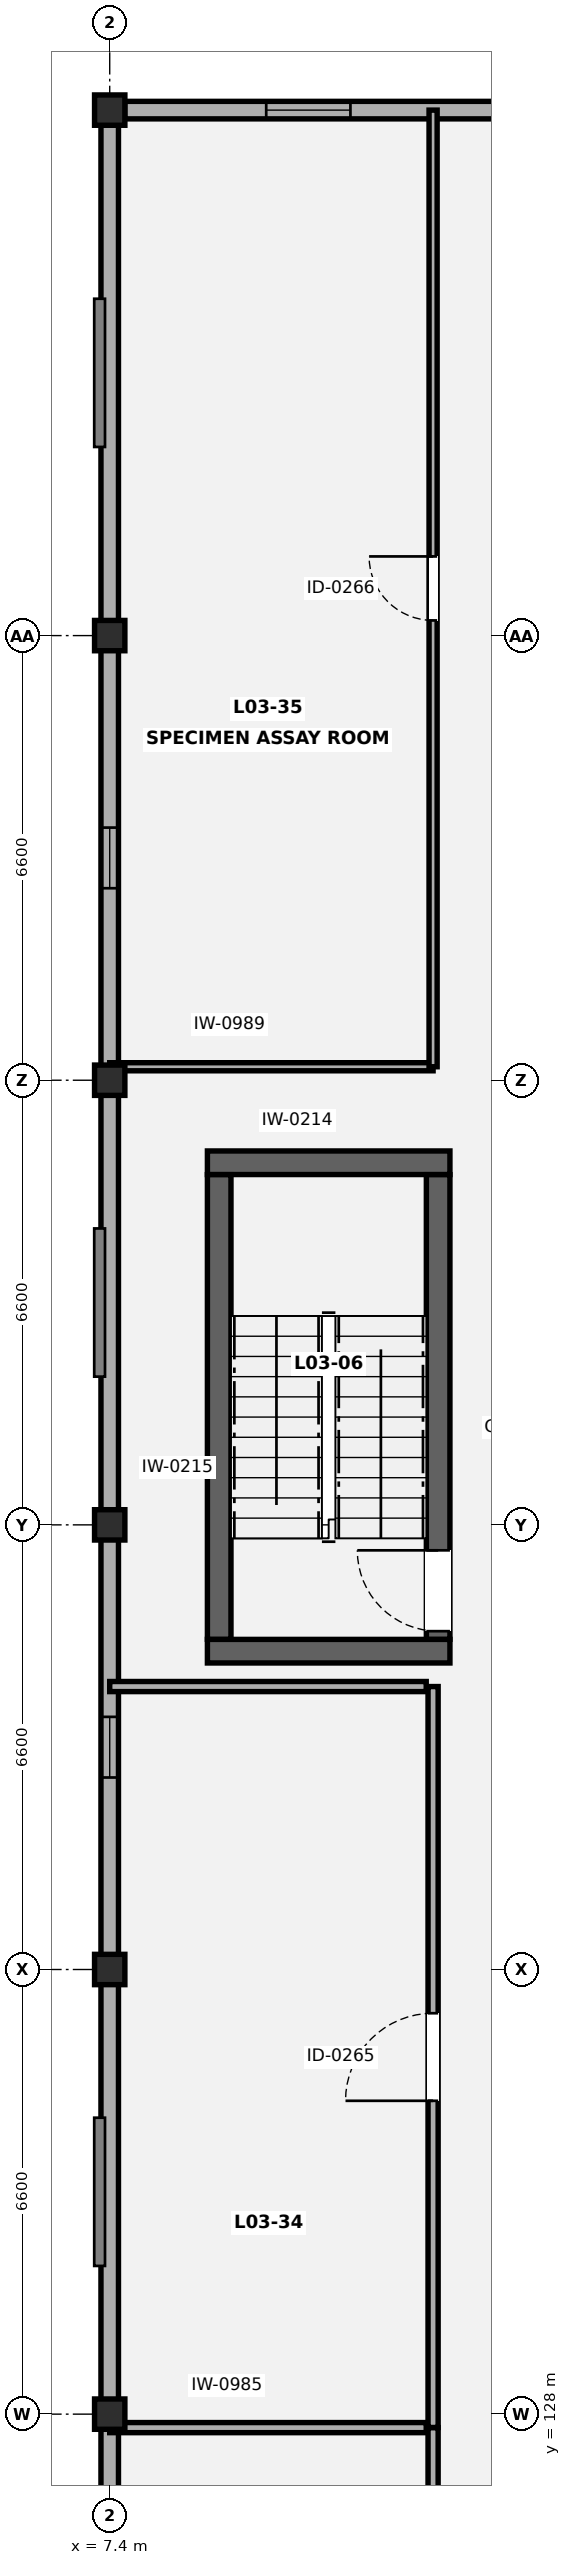
"""IFC4 building model, lengths in metres.
Left out: names, types, materials, properties, quantities, classifications, styles, units other than length and angle.
Written with IfcOpenShell. Run it as: python <this file> out.ifc"""

import sys

from ifc_helpers import new_model, si_unit, direction, frame, frame_2d, origin, origin_2d, place, context, subcontext, project, spatial, rectangle, extrude, element, fill, save


model = new_model("IFC4")
c1 = context("Model", 3, precision=1e-05, world=origin(), true_north=direction((0.0, 1.0)))
c2 = subcontext(c1, "Body", "Model", "MODEL_VIEW")
j1 = project(units=[si_unit("LENGTHUNIT", "METRE"), si_unit("PLANEANGLEUNIT", "RADIAN")], contexts=[c1])
p1 = place(None, origin())
s1 = spatial("IfcSite", under=j1, at=p1, CompositionType="ELEMENT")
p2 = place(p1, origin())
s2 = spatial("IfcBuilding", under=s1, at=p2, CompositionType="ELEMENT")
p3 = place(p2, frame((0.0, 0.0, 13.3)))
s3 = spatial("IfcBuildingStorey", under=s2, at=p3, CompositionType="ELEMENT", Elevation=13.3)
for number, where, z_axis, x_axis in (
    (1, (7.4, 128.0, 0.0), (0.0, 0.0, 1.0), (1.0, 0.0, 0.0)),
    (2, (7.4, 134.6, 0.0), (0.0, 0.0, 1.0), (1.0, 0.0, 0.0)),
    (3, (7.4, 141.2, 0.0), (0.0, 0.0, 1.0), (1.0, 0.0, 0.0)),
    (4, (7.4, 147.8, 0.0), (0.0, 0.0, 1.0), (1.0, 0.0, 0.0)),
):
    element("IfcColumn", number, at=place(p3, frame(where, z_axis=z_axis, x_axis=x_axis)), inside=s3, PredefinedType="PILASTER", context=c2, shape_type="SweptSolid", body=[
        extrude(rectangle(XDim=0.45, YDim=0.45, at=origin_2d()), origin(), (0.0, 0.0, 1.0), 4.2),
    ])
for number, where, z_axis, x_axis in (
    (5, (7.4, 154.4, 0.0), (0.0, 0.0, 1.0), (1.0, 0.0, 0.0)),
    (6, (7.4, 162.2, 0.0), (0.0, 0.0, 1.0), (1.0, 0.0, 0.0)),
):
    element("IfcColumn", number, at=place(p3, frame(where, z_axis=z_axis, x_axis=x_axis)), inside=s3, PredefinedType="PILASTER", context=c2, shape_type="SweptSolid", body=[
        extrude(rectangle(XDim=0.45, YDim=0.45, at=origin_2d()), origin(), (0.0, 0.0, 1.0), 3.92),
    ])
p4 = place(p3, frame((7.4, 95.223, 0.0), z_axis=(0.0, 0.0, 1.0), x_axis=(0.0, 1.0, 0.0)))
e7 = element("IfcWall", 7, at=p4, inside=s3, PredefinedType="SOLIDWALL", context=c2, shape_type="SweptSolid", body=[
    extrude(rectangle(XDim=66.754, YDim=0.26, at=frame_2d((33.377, 0.0))), origin(), (0.0, 0.0, 1.0), 2.885),
])
p5 = place(p4, frame((15.827, 0.0, 0.85)))
e8 = element("IfcOpeningElement", 8, at=p5, cuts=e7, PredefinedType="OPENING", context=c2, shape_type="SweptSolid", body=[
    extrude(rectangle(XDim=0.9, YDim=1.35, at=frame_2d((0.45, 0.675))), frame((0.0, 0.14, 0.0), z_axis=(0.0, -1.0, 0.0), x_axis=(1.0, 0.0, 0.0)), (0.0, 0.0, 1.0), 0.28),
])
p6 = place(p4, frame((29.027, 0.0, 0.85)))
e9 = element("IfcOpeningElement", 9, at=p6, cuts=e7, PredefinedType="OPENING", context=c2, shape_type="SweptSolid", body=[
    extrude(rectangle(XDim=0.9, YDim=1.35, at=frame_2d((0.45, 0.675))), frame((0.0, 0.14, 0.0), z_axis=(0.0, -1.0, 0.0), x_axis=(1.0, 0.0, 0.0)), (0.0, 0.0, 1.0), 0.28),
])
p7 = place(p4, frame((42.227, 0.0, 0.85)))
e10 = element("IfcOpeningElement", 10, at=p7, cuts=e7, PredefinedType="OPENING", context=c2, shape_type="SweptSolid", body=[
    extrude(rectangle(XDim=0.9, YDim=1.35, at=frame_2d((0.45, 0.675))), frame((0.0, 0.14, 0.0), z_axis=(0.0, -1.0, 0.0), x_axis=(1.0, 0.0, 0.0)), (0.0, 0.0, 1.0), 0.28),
])
p8 = place(p4, frame((55.427, 0.0, 0.85)))
e11 = element("IfcOpeningElement", 11, at=p8, cuts=e7, PredefinedType="OPENING", context=c2, shape_type="SweptSolid", body=[
    extrude(rectangle(XDim=0.9, YDim=1.35, at=frame_2d((0.45, 0.675))), frame((0.0, 0.14, 0.0), z_axis=(0.0, -1.0, 0.0), x_axis=(1.0, 0.0, 0.0)), (0.0, 0.0, 1.0), 0.28),
])
p9 = place(p3, frame((7.623, 162.2, 0.0), z_axis=(0.0, 0.0, 1.0), x_axis=(1.0, 0.0, 0.0)))
e12 = element("IfcWall", 12, at=p9, inside=s3, PredefinedType="SOLIDWALL", context=c2, shape_type="SweptSolid", body=[
    extrude(rectangle(XDim=6.154, YDim=0.26, at=frame_2d((3.077, 0.0))), origin(), (0.0, 0.0, 1.0), 2.48),
])
p10 = place(p9, frame((2.1, 0.0, 0.85)))
e13 = element("IfcOpeningElement", 13, at=p10, cuts=e12, PredefinedType="OPENING", context=c2, shape_type="SweptSolid", body=[
    extrude(rectangle(XDim=1.25, YDim=1.4, at=frame_2d((0.625, 0.7))), frame((0.0, 0.14, 0.0), z_axis=(0.0, -1.0, 0.0), x_axis=(1.0, 0.0, 0.0)), (0.0, 0.0, 1.0), 0.28),
])
for number, where, z_axis, x_axis in (
    (14, (8.85, 139.325, 0.0), (0.0, 0.0, 1.0), (1.0, 0.0, 0.0)),
    (15, (8.85, 146.575, 0.0), (0.0, 0.0, 1.0), (1.0, 0.0, 0.0)),
):
    element("IfcWall", number, at=place(p3, frame(where, z_axis=z_axis, x_axis=x_axis)), inside=s3, PredefinedType="SHEAR", context=c2, shape_type="SweptSolid", body=[
        extrude(rectangle(XDim=3.6, YDim=0.35, at=frame_2d((1.8, 0.0))), origin(), (0.0, 0.0, 1.0), 3.85),
    ])
p11 = place(p3, frame((9.025, 139.502, 0.0), z_axis=(0.0, 0.0, 1.0), x_axis=(0.0, 1.0, 0.0)))
e16 = element("IfcWall", 16, at=p11, inside=s3, PredefinedType="SHEAR", context=c2, shape_type="SweptSolid", body=[
    extrude(rectangle(XDim=6.896, YDim=0.35, at=frame_2d((3.448, 0.0))), origin(), (0.0, 0.0, 1.0), 3.85),
])
p12 = place(p3, frame((12.275, 139.502, 0.0), z_axis=(0.0, 0.0, 1.0), x_axis=(0.0, 1.0, 0.0)))
e17 = element("IfcWall", 17, at=p12, inside=s3, PredefinedType="SHEAR", context=c2, shape_type="SweptSolid", body=[
    extrude(rectangle(XDim=6.896, YDim=0.35, at=frame_2d((3.448, 0.0))), origin(), (0.0, 0.0, 1.0), 3.85),
])
p13 = place(p12, frame((0.12, 0.0, 0.0)))
e18 = element("IfcOpeningElement", 18, at=p13, cuts=e17, PredefinedType="OPENING", context=c2, shape_type="SweptSolid", body=[
    extrude(rectangle(XDim=1.2, YDim=2.15, at=frame_2d((0.6, 1.075))), frame((0.0, 0.185, 0.0), z_axis=(0.0, -1.0, 0.0), x_axis=(1.0, 0.0, 0.0)), (0.0, 0.0, 1.0), 0.37),
])
p14 = place(p3, frame((7.4, 127.8, 0.0), z_axis=(0.0, 0.0, 1.0), x_axis=(1.0, 0.0, 0.0)))
e19 = element("IfcWall", 19, at=p14, inside=s3, PredefinedType="PARTITIONING", context=c2, shape_type="SweptSolid", body=[
    extrude(rectangle(XDim=4.698, YDim=0.15, at=frame_2d((2.349, 0.0))), origin(), (0.0, 0.0, 1.0), 2.435),
])
p15 = place(p3, frame((12.2, 114.502, 0.0), z_axis=(0.0, 0.0, 1.0), x_axis=(0.0, 1.0, 0.0)))
e20 = element("IfcWall", 20, at=p15, inside=s3, PredefinedType="PARTITIONING", context=c2, shape_type="SweptSolid", body=[
    extrude(rectangle(XDim=13.298, YDim=0.15, at=frame_2d((6.649, 0.0))), origin(), (0.0, 0.0, 1.0), 3.85),
])
p16 = place(p15, frame((5.649, 0.0, 0.0)))
e21 = element("IfcOpeningElement", 21, at=p16, cuts=e20, PredefinedType="OPENING", context=c2, shape_type="SweptSolid", body=[
    extrude(rectangle(XDim=1.3, YDim=2.2, at=frame_2d((0.65, 1.1))), frame((0.0, 0.085, 0.0), z_axis=(0.0, -1.0, 0.0), x_axis=(1.0, 0.0, 0.0)), (0.0, 0.0, 1.0), 0.17),
])
p17 = place(p3, frame((7.4, 138.8, 0.0), z_axis=(0.0, 0.0, 1.0), x_axis=(1.0, 0.0, 0.0)))
e22 = element("IfcWall", 22, at=p17, inside=s3, PredefinedType="PARTITIONING", context=c2, shape_type="SweptSolid", body=[
    extrude(rectangle(XDim=4.698, YDim=0.15, at=frame_2d((2.349, 0.0))), origin(), (0.0, 0.0, 1.0), 3.85),
])
p18 = place(p3, frame((12.2, 127.802, 0.0), z_axis=(0.0, 0.0, 1.0), x_axis=(0.0, 1.0, 0.0)))
e23 = element("IfcWall", 23, at=p18, inside=s3, PredefinedType="PARTITIONING", context=c2, shape_type="SweptSolid", body=[
    extrude(rectangle(XDim=10.998, YDim=0.15, at=frame_2d((5.499, 0.0))), origin(), (0.0, 0.0, 1.0), 3.85),
])
p19 = place(p18, frame((4.849, 0.0, 0.0)))
e24 = element("IfcOpeningElement", 24, at=p19, cuts=e23, PredefinedType="OPENING", context=c2, shape_type="SweptSolid", body=[
    extrude(rectangle(XDim=1.3, YDim=2.2, at=frame_2d((0.65, 1.1))), frame((0.0, 0.085, 0.0), z_axis=(0.0, -1.0, 0.0), x_axis=(1.0, 0.0, 0.0)), (0.0, 0.0, 1.0), 0.17),
])
p20 = place(p3, frame((7.4, 148.0, 0.0), z_axis=(0.0, 0.0, 1.0), x_axis=(1.0, 0.0, 0.0)))
e25 = element("IfcWall", 25, at=p20, inside=s3, PredefinedType="PARTITIONING", context=c2, shape_type="SweptSolid", body=[
    extrude(rectangle(XDim=4.8, YDim=0.12, at=frame_2d((2.4, 0.0))), origin(), (0.0, 0.0, 1.0), 2.435),
])
p21 = place(p3, frame((12.2, 148.0, 0.0), z_axis=(0.0, 0.0, 1.0), x_axis=(0.0, 1.0, 0.0)))
e26 = element("IfcWall", 26, at=p21, inside=s3, PredefinedType="PARTITIONING", context=c2, shape_type="SweptSolid", body=[
    extrude(rectangle(XDim=14.2, YDim=0.12, at=frame_2d((7.1, 0.0))), origin(), (0.0, 0.0, 1.0), 3.85),
])
p22 = place(p21, frame((6.625, 0.0, 0.0)))
e27 = element("IfcOpeningElement", 27, at=p22, cuts=e26, PredefinedType="OPENING", context=c2, shape_type="SweptSolid", body=[
    extrude(rectangle(XDim=0.95, YDim=2.1, at=frame_2d((0.475, 1.05))), frame((0.0, 0.07, 0.0), z_axis=(0.0, -1.0, 0.0), x_axis=(1.0, 0.0, 0.0)), (0.0, 0.0, 1.0), 0.14),
])
p23 = place(p7, origin())
e28 = element("IfcWindow", 28, at=p23, inside=s3, PartitioningType="SINGLE_PANEL", PredefinedType="WINDOW", context=c2, shape_type="SweptSolid", body=[
    extrude(rectangle(XDim=0.9, YDim=1.35, at=frame_2d((0.45, 0.675))), frame((0.0, 0.03, 0.0), z_axis=(0.0, -1.0, 0.0), x_axis=(1.0, 0.0, 0.0)), (0.0, 0.0, 1.0), 0.06),
])
fill(e10, e28)
p24 = place(p8, origin())
e29 = element("IfcWindow", 29, at=p24, inside=s3, PartitioningType="SINGLE_PANEL", PredefinedType="WINDOW", context=c2, shape_type="SweptSolid", body=[
    extrude(rectangle(XDim=0.9, YDim=1.35, at=frame_2d((0.45, 0.675))), frame((0.0, 0.03, 0.0), z_axis=(0.0, -1.0, 0.0), x_axis=(1.0, 0.0, 0.0)), (0.0, 0.0, 1.0), 0.06),
])
fill(e11, e29)
p25 = place(p10, origin())
e30 = element("IfcWindow", 30, at=p25, inside=s3, PartitioningType="SINGLE_PANEL", PredefinedType="WINDOW", context=c2, shape_type="SweptSolid", body=[
    extrude(rectangle(XDim=1.25, YDim=1.4, at=frame_2d((0.625, 0.7))), frame((0.0, 0.03, 0.0), z_axis=(0.0, -1.0, 0.0), x_axis=(1.0, 0.0, 0.0)), (0.0, 0.0, 1.0), 0.06),
])
fill(e13, e30)
p26 = place(p13, origin())
e31 = element("IfcDoor", 31, at=p26, inside=s3, OperationType="SINGLE_SWING_RIGHT", PredefinedType="DOOR", context=c2, shape_type="SweptSolid", body=[
    extrude(rectangle(XDim=1.2, YDim=2.15, at=frame_2d((0.6, 1.075))), frame((0.0, 0.025, 0.0), z_axis=(0.0, -1.0, 0.0), x_axis=(1.0, 0.0, 0.0)), (0.0, 0.0, 1.0), 0.05),
])
fill(e18, e31)
p27 = place(p19, origin())
e32 = element("IfcDoor", 32, at=p27, inside=s3, OperationType="SINGLE_SWING_LEFT", PredefinedType="DOOR", context=c2, shape_type="SweptSolid", body=[
    extrude(rectangle(XDim=1.3, YDim=2.2, at=frame_2d((0.65, 1.1))), frame((0.0, 0.025, 0.0), z_axis=(0.0, -1.0, 0.0), x_axis=(1.0, 0.0, 0.0)), (0.0, 0.0, 1.0), 0.05),
])
fill(e24, e32)
p28 = place(p22, origin())
e33 = element("IfcDoor", 33, at=p28, inside=s3, OperationType="SINGLE_SWING_RIGHT", PredefinedType="DOOR", context=c2, shape_type="SweptSolid", body=[
    extrude(rectangle(XDim=0.95, YDim=2.1, at=frame_2d((0.475, 1.05))), frame((0.0, 0.025, 0.0), z_axis=(0.0, -1.0, 0.0), x_axis=(1.0, 0.0, 0.0)), (0.0, 0.0, 1.0), 0.05),
])
fill(e27, e33)
save(model, sys.argv[1])
